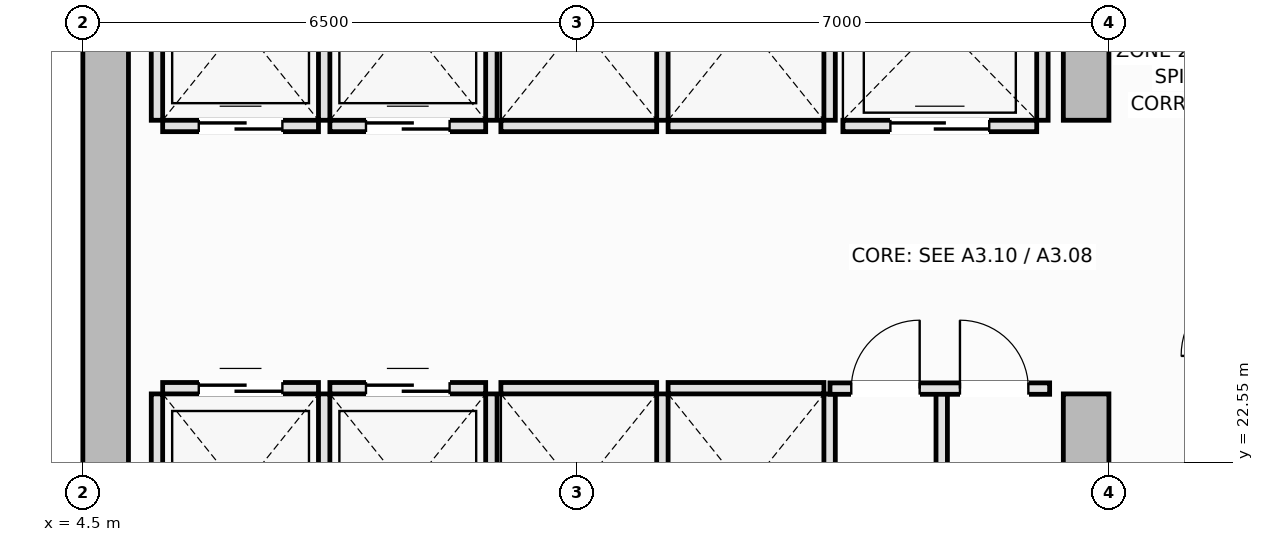
"""IFC4 building model, lengths in metres.
Left out: names, types, materials, properties, quantities, classifications, styles, units other than length and angle.
Written with IfcOpenShell. Run it as: python <this file> out.ifc"""

import sys

from ifc_helpers import new_model, si_unit, direction, frame, frame_2d, origin, place, context, subcontext, project, spatial, rectangle, extrude, element, fill, save


model = new_model("IFC4")
c1 = context("Model", 3, precision=1e-05, world=origin(), true_north=direction((0.0, 1.0)))
c2 = subcontext(c1, "Body", "Model", "MODEL_VIEW")
j1 = project(units=[si_unit("LENGTHUNIT", "METRE"), si_unit("PLANEANGLEUNIT", "RADIAN")], contexts=[c1])
p1 = place(None, origin())
s1 = spatial("IfcSite", under=j1, at=p1, CompositionType="ELEMENT")
p2 = place(p1, origin())
s2 = spatial("IfcBuilding", under=s1, at=p2, CompositionType="ELEMENT")
p3 = place(p2, frame((0.0, 0.0, 116.45)))
s3 = spatial("IfcBuildingStorey", under=s2, at=p3, CompositionType="ELEMENT", Elevation=116.45)
p4 = place(p3, frame((4.8, 14.6, 0.0), z_axis=(0.0, 0.0, 1.0), x_axis=(0.0, 1.0, 0.0)))
e1 = element("IfcWall", 1, at=p4, inside=s3, PredefinedType="SHEAR", context=c2, shape_type="SweptSolid", body=[
    extrude(rectangle(XDim=21.3, YDim=0.6, at=frame_2d((10.65, 0.0))), origin(), (0.0, 0.0, 1.0), 3.55),
])
p5 = place(p3, frame((17.7, 14.6, 0.0), z_axis=(0.0, 0.0, 1.0), x_axis=(0.0, 1.0, 0.0)))
e2 = element("IfcWall", 2, at=p5, inside=s3, PredefinedType="SHEAR", context=c2, shape_type="SweptSolid", body=[
    extrude(rectangle(XDim=8.85, YDim=0.6, at=frame_2d((4.425, 0.0))), origin(), (0.0, 0.0, 1.0), 3.55),
])
p6 = place(p5, frame((4.3, 0.0, 0.0)))
e3 = element("IfcOpeningElement", 3, at=p6, cuts=e2, PredefinedType="OPENING", context=c2, shape_type="SweptSolid", body=[
    extrude(rectangle(XDim=1.1, YDim=2.15, at=frame_2d((0.55, 1.075))), frame((0.0, 0.31, 0.0), z_axis=(0.0, -1.0, 0.0), x_axis=(1.0, 0.0, 0.0)), (0.0, 0.0, 1.0), 0.62),
])
p7 = place(p3, frame((17.7, 27.05, 0.0), z_axis=(0.0, 0.0, 1.0), x_axis=(0.0, 1.0, 0.0)))
e4 = element("IfcWall", 4, at=p7, inside=s3, PredefinedType="SHEAR", context=c2, shape_type="SweptSolid", body=[
    extrude(rectangle(XDim=8.85, YDim=0.6, at=frame_2d((4.425, 0.0))), origin(), (0.0, 0.0, 1.0), 3.55),
])
p8 = place(p7, frame((3.45, 0.0, 0.0)))
e5 = element("IfcOpeningElement", 5, at=p8, cuts=e4, PredefinedType="OPENING", context=c2, shape_type="SweptSolid", body=[
    extrude(rectangle(XDim=1.1, YDim=2.15, at=frame_2d((0.55, 1.075))), frame((0.0, 0.31, 0.0), z_axis=(0.0, -1.0, 0.0), x_axis=(1.0, 0.0, 0.0)), (0.0, 0.0, 1.0), 0.62),
])
p9 = place(p3, frame((5.55, 23.525, 0.0), z_axis=(0.0, 0.0, 1.0), x_axis=(1.0, 0.0, 0.0)))
e6 = element("IfcWall", 6, at=p9, inside=s3, PredefinedType="PARTITIONING", context=c2, shape_type="SweptSolid", body=[
    extrude(rectangle(XDim=2.05, YDim=0.15, at=frame_2d((1.025, 0.0))), origin(), (0.0, 0.0, 1.0), 3.37),
])
p10 = place(p9, frame((0.475, 0.0, 0.0)))
e7 = element("IfcOpeningElement", 7, at=p10, cuts=e6, PredefinedType="OPENING", context=c2, shape_type="SweptSolid", body=[
    extrude(rectangle(XDim=1.1, YDim=2.2, at=frame_2d((0.55, 1.1))), frame((0.0, 0.085, 0.0), z_axis=(0.0, -1.0, 0.0), x_axis=(1.0, 0.0, 0.0)), (0.0, 0.0, 1.0), 0.17),
])
for number, where, z_axis, x_axis in (
    (8, (5.475, 20.9, 0.0), (0.0, 0.0, 1.0), (0.0, 1.0, 0.0)),
    (9, (7.675, 20.9, 0.0), (0.0, 0.0, 1.0), (0.0, 1.0, 0.0)),
):
    element("IfcWall", number, at=place(p3, frame(where, z_axis=z_axis, x_axis=x_axis)), inside=s3, PredefinedType="PARTITIONING", context=c2, shape_type="SweptSolid", body=[
        extrude(rectangle(XDim=2.55, YDim=0.15, at=frame_2d((1.275, 0.0))), origin(), (0.0, 0.0, 1.0), 3.37),
    ])
p11 = place(p3, frame((7.75, 23.525, 0.0), z_axis=(0.0, 0.0, 1.0), x_axis=(1.0, 0.0, 0.0)))
e10 = element("IfcWall", 10, at=p11, inside=s3, PredefinedType="PARTITIONING", context=c2, shape_type="SweptSolid", body=[
    extrude(rectangle(XDim=2.05, YDim=0.15, at=frame_2d((1.025, 0.0))), origin(), (0.0, 0.0, 1.0), 3.37),
])
p12 = place(p11, frame((0.475, 0.0, 0.0)))
e11 = element("IfcOpeningElement", 11, at=p12, cuts=e10, PredefinedType="OPENING", context=c2, shape_type="SweptSolid", body=[
    extrude(rectangle(XDim=1.1, YDim=2.2, at=frame_2d((0.55, 1.1))), frame((0.0, 0.085, 0.0), z_axis=(0.0, -1.0, 0.0), x_axis=(1.0, 0.0, 0.0)), (0.0, 0.0, 1.0), 0.17),
])
p13 = place(p3, frame((9.875, 20.9, 0.0), z_axis=(0.0, 0.0, 1.0), x_axis=(0.0, 1.0, 0.0)))
e12 = element("IfcWall", 12, at=p13, inside=s3, PredefinedType="PARTITIONING", context=c2, shape_type="SweptSolid", body=[
    extrude(rectangle(XDim=2.55, YDim=0.15, at=frame_2d((1.275, 0.0))), origin(), (0.0, 0.0, 1.0), 3.37),
])
p14 = place(p3, frame((5.55, 26.975, 0.0), z_axis=(0.0, 0.0, 1.0), x_axis=(1.0, 0.0, 0.0)))
e13 = element("IfcWall", 13, at=p14, inside=s3, PredefinedType="PARTITIONING", context=c2, shape_type="SweptSolid", body=[
    extrude(rectangle(XDim=2.05, YDim=0.15, at=frame_2d((1.025, 0.0))), origin(), (0.0, 0.0, 1.0), 3.37),
])
p15 = place(p14, frame((0.475, 0.0, 0.0)))
e14 = element("IfcOpeningElement", 14, at=p15, cuts=e13, PredefinedType="OPENING", context=c2, shape_type="SweptSolid", body=[
    extrude(rectangle(XDim=1.1, YDim=2.2, at=frame_2d((0.55, 1.1))), frame((0.0, 0.085, 0.0), z_axis=(0.0, -1.0, 0.0), x_axis=(1.0, 0.0, 0.0)), (0.0, 0.0, 1.0), 0.17),
])
for number, where, z_axis, x_axis in (
    (15, (5.475, 27.05, 0.0), (0.0, 0.0, 1.0), (0.0, 1.0, 0.0)),
    (16, (7.675, 27.05, 0.0), (0.0, 0.0, 1.0), (0.0, 1.0, 0.0)),
):
    element("IfcWall", number, at=place(p3, frame(where, z_axis=z_axis, x_axis=x_axis)), inside=s3, PredefinedType="PARTITIONING", context=c2, shape_type="SweptSolid", body=[
        extrude(rectangle(XDim=2.55, YDim=0.15, at=frame_2d((1.275, 0.0))), origin(), (0.0, 0.0, 1.0), 3.37),
    ])
p16 = place(p3, frame((7.75, 26.975, 0.0), z_axis=(0.0, 0.0, 1.0), x_axis=(1.0, 0.0, 0.0)))
e17 = element("IfcWall", 17, at=p16, inside=s3, PredefinedType="PARTITIONING", context=c2, shape_type="SweptSolid", body=[
    extrude(rectangle(XDim=2.05, YDim=0.15, at=frame_2d((1.025, 0.0))), origin(), (0.0, 0.0, 1.0), 3.37),
])
p17 = place(p16, frame((0.475, 0.0, 0.0)))
e18 = element("IfcOpeningElement", 18, at=p17, cuts=e17, PredefinedType="OPENING", context=c2, shape_type="SweptSolid", body=[
    extrude(rectangle(XDim=1.1, YDim=2.2, at=frame_2d((0.55, 1.1))), frame((0.0, 0.085, 0.0), z_axis=(0.0, -1.0, 0.0), x_axis=(1.0, 0.0, 0.0)), (0.0, 0.0, 1.0), 0.17),
])
p18 = place(p3, frame((9.875, 27.05, 0.0), z_axis=(0.0, 0.0, 1.0), x_axis=(0.0, 1.0, 0.0)))
e19 = element("IfcWall", 19, at=p18, inside=s3, PredefinedType="PARTITIONING", context=c2, shape_type="SweptSolid", body=[
    extrude(rectangle(XDim=2.55, YDim=0.15, at=frame_2d((1.275, 0.0))), origin(), (0.0, 0.0, 1.0), 3.37),
])
p19 = place(p3, frame((10.0, 23.525, 0.0), z_axis=(0.0, 0.0, 1.0), x_axis=(1.0, 0.0, 0.0)))
e20 = element("IfcWall", 20, at=p19, inside=s3, PredefinedType="PARTITIONING", context=c2, shape_type="SweptSolid", body=[
    extrude(rectangle(XDim=2.05, YDim=0.15, at=frame_2d((1.025, 0.0))), origin(), (0.0, 0.0, 1.0), 3.37),
])
p20 = place(p3, frame((12.125, 20.9, 0.0), z_axis=(0.0, 0.0, 1.0), x_axis=(0.0, 1.0, 0.0)))
e21 = element("IfcWall", 21, at=p20, inside=s3, PredefinedType="PARTITIONING", context=c2, shape_type="SweptSolid", body=[
    extrude(rectangle(XDim=2.55, YDim=0.15, at=frame_2d((1.275, 0.0))), origin(), (0.0, 0.0, 1.0), 3.37),
])
p21 = place(p3, frame((12.2, 23.525, 0.0), z_axis=(0.0, 0.0, 1.0), x_axis=(1.0, 0.0, 0.0)))
e22 = element("IfcWall", 22, at=p21, inside=s3, PredefinedType="PARTITIONING", context=c2, shape_type="SweptSolid", body=[
    extrude(rectangle(XDim=2.05, YDim=0.15, at=frame_2d((1.025, 0.0))), origin(), (0.0, 0.0, 1.0), 3.37),
])
p22 = place(p3, frame((14.325, 20.9, 0.0), z_axis=(0.0, 0.0, 1.0), x_axis=(0.0, 1.0, 0.0)))
e23 = element("IfcWall", 23, at=p22, inside=s3, PredefinedType="PARTITIONING", context=c2, shape_type="SweptSolid", body=[
    extrude(rectangle(XDim=2.55, YDim=0.15, at=frame_2d((1.275, 0.0))), origin(), (0.0, 0.0, 1.0), 3.37),
])
p23 = place(p3, frame((10.0, 26.975, 0.0), z_axis=(0.0, 0.0, 1.0), x_axis=(1.0, 0.0, 0.0)))
e24 = element("IfcWall", 24, at=p23, inside=s3, PredefinedType="PARTITIONING", context=c2, shape_type="SweptSolid", body=[
    extrude(rectangle(XDim=2.05, YDim=0.15, at=frame_2d((1.025, 0.0))), origin(), (0.0, 0.0, 1.0), 3.37),
])
p24 = place(p3, frame((12.125, 27.05, 0.0), z_axis=(0.0, 0.0, 1.0), x_axis=(0.0, 1.0, 0.0)))
e25 = element("IfcWall", 25, at=p24, inside=s3, PredefinedType="PARTITIONING", context=c2, shape_type="SweptSolid", body=[
    extrude(rectangle(XDim=2.55, YDim=0.15, at=frame_2d((1.275, 0.0))), origin(), (0.0, 0.0, 1.0), 3.37),
])
p25 = place(p3, frame((12.2, 26.975, 0.0), z_axis=(0.0, 0.0, 1.0), x_axis=(1.0, 0.0, 0.0)))
e26 = element("IfcWall", 26, at=p25, inside=s3, PredefinedType="PARTITIONING", context=c2, shape_type="SweptSolid", body=[
    extrude(rectangle(XDim=2.05, YDim=0.15, at=frame_2d((1.025, 0.0))), origin(), (0.0, 0.0, 1.0), 3.37),
])
p26 = place(p3, frame((14.325, 27.05, 0.0), z_axis=(0.0, 0.0, 1.0), x_axis=(0.0, 1.0, 0.0)))
e27 = element("IfcWall", 27, at=p26, inside=s3, PredefinedType="PARTITIONING", context=c2, shape_type="SweptSolid", body=[
    extrude(rectangle(XDim=2.55, YDim=0.15, at=frame_2d((1.275, 0.0))), origin(), (0.0, 0.0, 1.0), 3.37),
])
p27 = place(p3, frame((14.5, 26.975, 0.0), z_axis=(0.0, 0.0, 1.0), x_axis=(1.0, 0.0, 0.0)))
e28 = element("IfcWall", 28, at=p27, inside=s3, PredefinedType="PARTITIONING", context=c2, shape_type="SweptSolid", body=[
    extrude(rectangle(XDim=2.55, YDim=0.15, at=frame_2d((1.275, 0.0))), origin(), (0.0, 0.0, 1.0), 3.37),
])
p28 = place(p27, frame((0.625, 0.0, 0.0)))
e29 = element("IfcOpeningElement", 29, at=p28, cuts=e28, PredefinedType="OPENING", context=c2, shape_type="SweptSolid", body=[
    extrude(rectangle(XDim=1.3, YDim=2.2, at=frame_2d((0.65, 1.1))), frame((0.0, 0.085, 0.0), z_axis=(0.0, -1.0, 0.0), x_axis=(1.0, 0.0, 0.0)), (0.0, 0.0, 1.0), 0.17),
])
p29 = place(p3, frame((17.125, 27.05, 0.0), z_axis=(0.0, 0.0, 1.0), x_axis=(0.0, 1.0, 0.0)))
e30 = element("IfcWall", 30, at=p29, inside=s3, PredefinedType="PARTITIONING", context=c2, shape_type="SweptSolid", body=[
    extrude(rectangle(XDim=2.6, YDim=0.15, at=frame_2d((1.3, 0.0))), origin(), (0.0, 0.0, 1.0), 3.37),
])
p30 = place(p3, frame((15.8, 20.85, 0.0), z_axis=(0.0, 0.0, 1.0), x_axis=(0.0, 1.0, 0.0)))
e31 = element("IfcWall", 31, at=p30, inside=s3, PredefinedType="PARTITIONING", context=c2, shape_type="SweptSolid", body=[
    extrude(rectangle(XDim=2.67, YDim=0.15, at=frame_2d((1.335, 0.0))), origin(), (0.0, 0.0, 1.0), 3.37),
])
p31 = place(p3, frame((14.33, 23.52, 0.0), z_axis=(0.0, 0.0, 1.0), x_axis=(1.0, 0.0, 0.0)))
e32 = element("IfcWall", 32, at=p31, inside=s3, PredefinedType="PARTITIONING", context=c2, shape_type="SweptSolid", body=[
    extrude(rectangle(XDim=2.89, YDim=0.15, at=frame_2d((1.445, 0.0))), origin(), (0.0, 0.0, 1.0), 3.37),
])
p32 = place(p31, frame((0.28, 0.0, 0.0)))
e33 = element("IfcOpeningElement", 33, at=p32, cuts=e32, PredefinedType="OPENING", context=c2, shape_type="SweptSolid", body=[
    extrude(rectangle(XDim=0.9, YDim=2.1, at=frame_2d((0.45, 1.05))), frame((0.0, 0.085, 0.0), z_axis=(0.0, -1.0, 0.0), x_axis=(1.0, 0.0, 0.0)), (0.0, 0.0, 1.0), 0.17),
])
p33 = place(p31, frame((1.71, 0.0, 0.0)))
e34 = element("IfcOpeningElement", 34, at=p33, cuts=e32, PredefinedType="OPENING", context=c2, shape_type="SweptSolid", body=[
    extrude(rectangle(XDim=0.9, YDim=2.1, at=frame_2d((0.45, 1.05))), frame((0.0, 0.085, 0.0), z_axis=(0.0, -1.0, 0.0), x_axis=(1.0, 0.0, 0.0)), (0.0, 0.0, 1.0), 0.17),
])
p34 = place(p10, origin())
e35 = element("IfcDoor", 35, at=p34, inside=s3, OperationType="DOUBLE_DOOR_SLIDING", PredefinedType="DOOR", context=c2, shape_type="SweptSolid", body=[
    extrude(rectangle(XDim=1.1, YDim=2.2, at=frame_2d((0.55, 1.1))), frame((0.0, 0.025, 0.0), z_axis=(0.0, -1.0, 0.0), x_axis=(1.0, 0.0, 0.0)), (0.0, 0.0, 1.0), 0.05),
])
fill(e7, e35)
p35 = place(p12, origin())
e36 = element("IfcDoor", 36, at=p35, inside=s3, OperationType="DOUBLE_DOOR_SLIDING", PredefinedType="DOOR", context=c2, shape_type="SweptSolid", body=[
    extrude(rectangle(XDim=1.1, YDim=2.2, at=frame_2d((0.55, 1.1))), frame((0.0, 0.025, 0.0), z_axis=(0.0, -1.0, 0.0), x_axis=(1.0, 0.0, 0.0)), (0.0, 0.0, 1.0), 0.05),
])
fill(e11, e36)
p36 = place(p15, origin())
e37 = element("IfcDoor", 37, at=p36, inside=s3, OperationType="DOUBLE_DOOR_SLIDING", PredefinedType="DOOR", context=c2, shape_type="SweptSolid", body=[
    extrude(rectangle(XDim=1.1, YDim=2.2, at=frame_2d((0.55, 1.1))), frame((0.0, 0.025, 0.0), z_axis=(0.0, -1.0, 0.0), x_axis=(1.0, 0.0, 0.0)), (0.0, 0.0, 1.0), 0.05),
])
fill(e14, e37)
p37 = place(p17, origin())
e38 = element("IfcDoor", 38, at=p37, inside=s3, OperationType="DOUBLE_DOOR_SLIDING", PredefinedType="DOOR", context=c2, shape_type="SweptSolid", body=[
    extrude(rectangle(XDim=1.1, YDim=2.2, at=frame_2d((0.55, 1.1))), frame((0.0, 0.025, 0.0), z_axis=(0.0, -1.0, 0.0), x_axis=(1.0, 0.0, 0.0)), (0.0, 0.0, 1.0), 0.05),
])
fill(e18, e38)
p38 = place(p28, origin())
e39 = element("IfcDoor", 39, at=p38, inside=s3, OperationType="DOUBLE_DOOR_SLIDING", PredefinedType="DOOR", context=c2, shape_type="SweptSolid", body=[
    extrude(rectangle(XDim=1.3, YDim=2.2, at=frame_2d((0.65, 1.1))), frame((0.0, 0.025, 0.0), z_axis=(0.0, -1.0, 0.0), x_axis=(1.0, 0.0, 0.0)), (0.0, 0.0, 1.0), 0.05),
])
fill(e29, e39)
p39 = place(p32, origin())
e40 = element("IfcDoor", 40, at=p39, inside=s3, OperationType="SINGLE_SWING_RIGHT", PredefinedType="DOOR", context=c2, shape_type="SweptSolid", body=[
    extrude(rectangle(XDim=0.9, YDim=2.1, at=frame_2d((0.45, 1.05))), frame((0.0, 0.025, 0.0), z_axis=(0.0, -1.0, 0.0), x_axis=(1.0, 0.0, 0.0)), (0.0, 0.0, 1.0), 0.05),
])
fill(e33, e40)
p40 = place(p33, origin())
e41 = element("IfcDoor", 41, at=p40, inside=s3, OperationType="SINGLE_SWING_LEFT", PredefinedType="DOOR", context=c2, shape_type="SweptSolid", body=[
    extrude(rectangle(XDim=0.9, YDim=2.1, at=frame_2d((0.45, 1.05))), frame((0.0, 0.025, 0.0), z_axis=(0.0, -1.0, 0.0), x_axis=(1.0, 0.0, 0.0)), (0.0, 0.0, 1.0), 0.05),
])
fill(e34, e41)
save(model, sys.argv[1])
